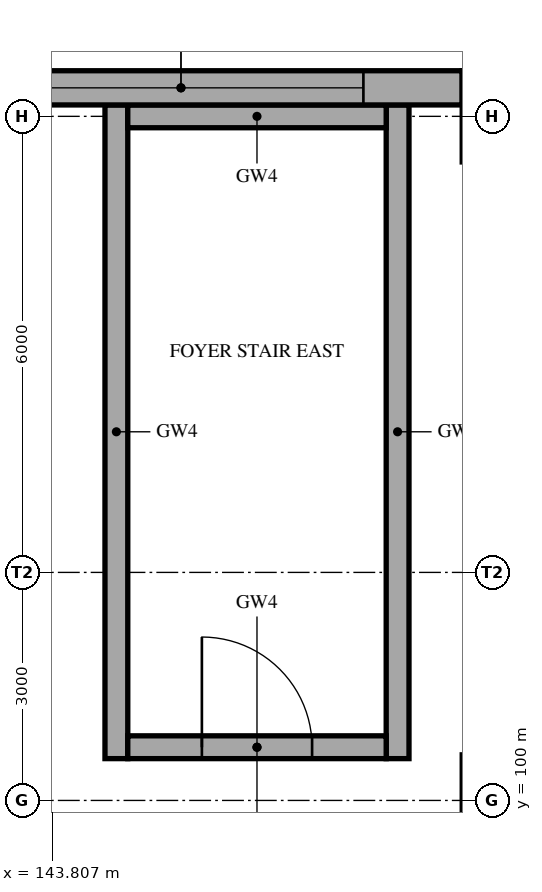
"""IFC4 building model, lengths in metres.
Left out: names, types, materials, properties, quantities, classifications, styles, units other than length and angle.
Written with IfcOpenShell. Run it as: python <this file> out.ifc"""

import sys

from ifc_helpers import new_model, si_unit, direction, frame, frame_2d, origin, place, context, subcontext, project, spatial, rectangle, extrude, element, fill, save


model = new_model("IFC4")
c1 = context("Model", 3, precision=1e-05, world=origin(), true_north=direction((0.0, 1.0)))
c2 = subcontext(c1, "Body", "Model", "MODEL_VIEW")
j1 = project(units=[si_unit("LENGTHUNIT", "METRE"), si_unit("PLANEANGLEUNIT", "RADIAN")], contexts=[c1])
p1 = place(None, origin())
s1 = spatial("IfcSite", under=j1, at=p1, CompositionType="ELEMENT")
p2 = place(p1, origin())
s2 = spatial("IfcBuilding", under=s1, at=p2, CompositionType="ELEMENT")
p3 = place(p2, frame((0.0, 0.0, 10.0)))
s3 = spatial("IfcBuildingStorey", under=s2, at=p3, CompositionType="ELEMENT", Elevation=10.0)
for number, where, z_axis, x_axis in (
    (1, (144.65, 100.55, 0.0), (0.0, 0.0, 1.0), (0.0, 1.0, 0.0)),
    (2, (148.35, 100.55, 0.0), (0.0, 0.0, 1.0), (0.0, 1.0, 0.0)),
):
    element("IfcWall", number, at=place(p3, frame(where, z_axis=z_axis, x_axis=x_axis)), inside=s3, PredefinedType="SHEAR", context=c2, shape_type="SweptSolid", body=[
        extrude(rectangle(XDim=8.6, YDim=0.3, at=frame_2d((4.3, 0.0))), origin(), (0.0, 0.0, 1.0), 4.6),
    ])
p4 = place(p3, frame((144.8, 100.7, 0.0), z_axis=(0.0, 0.0, 1.0), x_axis=(1.0, 0.0, 0.0)))
e3 = element("IfcWall", 3, at=p4, inside=s3, PredefinedType="SHEAR", context=c2, shape_type="SweptSolid", body=[
    extrude(rectangle(XDim=3.4, YDim=0.3, at=frame_2d((1.7, 0.0))), origin(), (0.0, 0.0, 1.0), 4.6),
])
p5 = place(p4, frame((0.975, 0.0, 0.0)))
e4 = element("IfcOpeningElement", 4, at=p5, cuts=e3, PredefinedType="OPENING", context=c2, shape_type="SweptSolid", body=[
    extrude(rectangle(XDim=1.45, YDim=2.1, at=frame_2d((0.725, 1.05))), frame((0.0, 0.16, 0.0), z_axis=(0.0, -1.0, 0.0), x_axis=(1.0, 0.0, 0.0)), (0.0, 0.0, 1.0), 0.32),
])
p6 = place(p3, frame((144.8, 109.0, 0.0), z_axis=(0.0, 0.0, 1.0), x_axis=(1.0, 0.0, 0.0)))
e5 = element("IfcWall", 5, at=p6, inside=s3, PredefinedType="SHEAR", context=c2, shape_type="SweptSolid", body=[
    extrude(rectangle(XDim=3.4, YDim=0.3, at=frame_2d((1.7, 0.0))), origin(), (0.0, 0.0, 1.0), 4.6),
])
p7 = place(p3, frame((141.8, 109.375, 0.0), z_axis=(0.0, 0.0, 1.0), x_axis=(1.0, 0.0, 0.0)))
e6 = element("IfcWall", 6, at=p7, inside=s3, PredefinedType="SOLIDWALL", context=c2, shape_type="SweptSolid", body=[
    extrude(rectangle(XDim=7.4, YDim=0.45, at=frame_2d((3.7, 0.0))), origin(), (0.0, 0.0, 1.0), 5.0),
])
p8 = place(p7, frame((1.3, 0.0, 0.9)))
e7 = element("IfcOpeningElement", 7, at=p8, cuts=e6, PredefinedType="OPENING", context=c2, shape_type="SweptSolid", body=[
    extrude(rectangle(XDim=4.8, YDim=3.0, at=frame_2d((2.4, 1.5))), frame((0.0, 0.235, 0.0), z_axis=(0.0, -1.0, 0.0), x_axis=(1.0, 0.0, 0.0)), (0.0, 0.0, 1.0), 0.47),
])
p9 = place(p8, origin())
e8 = element("IfcWindow", 8, at=p9, inside=s3, PartitioningType="SINGLE_PANEL", PredefinedType="WINDOW", context=c2, shape_type="SweptSolid", body=[
    extrude(rectangle(XDim=4.8, YDim=3.0, at=frame_2d((2.4, 1.5))), frame((0.0, 0.03, 0.0), z_axis=(0.0, -1.0, 0.0), x_axis=(1.0, 0.0, 0.0)), (0.0, 0.0, 1.0), 0.06),
])
fill(e7, e8)
p10 = place(p5, origin())
e9 = element("IfcDoor", 9, at=p10, inside=s3, OperationType="SINGLE_SWING_LEFT", PredefinedType="DOOR", context=c2, shape_type="SweptSolid", body=[
    extrude(rectangle(XDim=1.45, YDim=2.1, at=frame_2d((0.725, 1.05))), frame((0.0, 0.025, 0.0), z_axis=(0.0, -1.0, 0.0), x_axis=(1.0, 0.0, 0.0)), (0.0, 0.0, 1.0), 0.05),
])
fill(e4, e9)
save(model, sys.argv[1])
